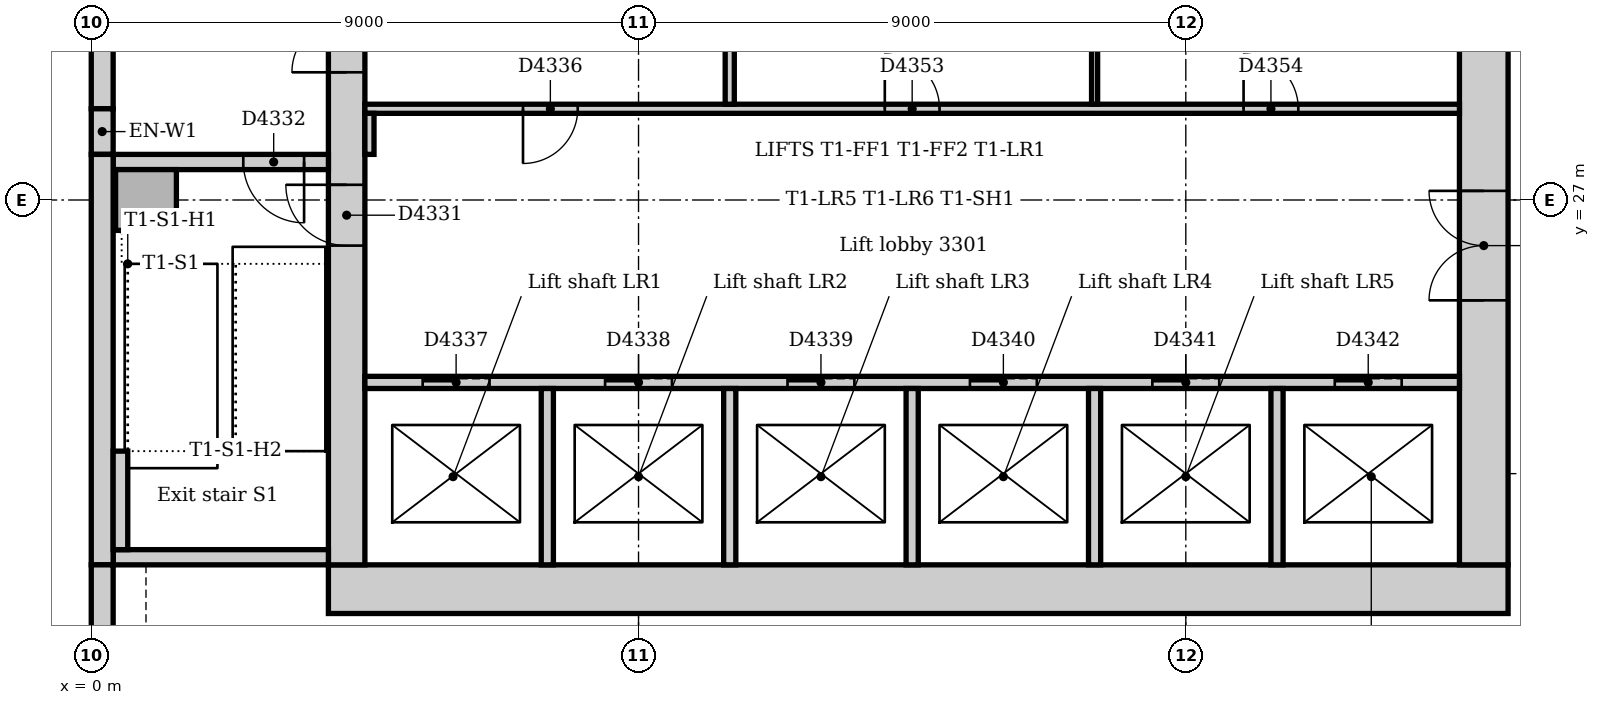
"""IFC4 building model, lengths in metres.
Left out: names, types, materials, properties, quantities, classifications, styles, units other than length and angle.
Written with IfcOpenShell. Run it as: python <this file> out.ifc"""

import sys

from ifc_helpers import new_model, si_unit, direction, frame, frame_2d, origin, origin_2d, place, context, subcontext, project, spatial, rectangle, extrude, element, fill, save


model = new_model("IFC4")
c1 = context("Model", 3, precision=1e-05, world=origin(), true_north=direction((0.0, 1.0)))
c2 = subcontext(c1, "Body", "Model", "MODEL_VIEW")
j1 = project(units=[si_unit("LENGTHUNIT", "METRE"), si_unit("PLANEANGLEUNIT", "RADIAN")], contexts=[c1])
p1 = place(None, origin())
s1 = spatial("IfcSite", under=j1, at=p1, CompositionType="ELEMENT")
p2 = place(p1, origin())
s2 = spatial("IfcBuilding", under=s1, at=p2, CompositionType="ELEMENT")
p3 = place(p2, frame((0.0, 0.0, 140.0)))
s3 = spatial("IfcBuildingStorey", under=s2, at=p3, CompositionType="ELEMENT", Elevation=140.0)
p4 = place(p3, frame((3.9, 20.6, 0.0), z_axis=(0.0, 0.0, 1.0), x_axis=(1.0, 0.0, 0.0)))
e1 = element("IfcWall", 1, at=p4, inside=s3, PredefinedType="SOLIDWALL", context=c2, shape_type="SweptSolid", body=[
    extrude(rectangle(XDim=19.4, YDim=0.8, at=frame_2d((9.7, 0.0))), origin(), (0.0, 0.0, 1.0), 4.0),
])
p5 = place(p3, frame((22.9, 21.0, 0.0), z_axis=(0.0, 0.0, 1.0), x_axis=(0.0, 1.0, 0.0)))
e2 = element("IfcWall", 2, at=p5, inside=s3, PredefinedType="SOLIDWALL", context=c2, shape_type="SweptSolid", body=[
    extrude(rectangle(XDim=10.5, YDim=0.8, at=frame_2d((5.25, 0.0))), origin(), (0.0, 0.0, 1.0), 4.0),
])
p6 = place(p5, frame((4.35, 0.0, 0.0)))
e3 = element("IfcOpeningElement", 3, at=p6, cuts=e2, PredefinedType="OPENING", context=c2, shape_type="SweptSolid", body=[
    extrude(rectangle(XDim=1.8, YDim=2.1, at=frame_2d((0.9, 1.05))), frame((0.0, 0.41, 0.0), z_axis=(0.0, -1.0, 0.0), x_axis=(1.0, 0.0, 0.0)), (0.0, 0.0, 1.0), 0.82),
])
p7 = place(p3, frame((4.2, 31.5, 0.0), z_axis=(0.0, 0.0, 1.0), x_axis=(0.0, -1.0, 0.0)))
e4 = element("IfcWall", 4, at=p7, inside=s3, PredefinedType="SOLIDWALL", context=c2, shape_type="SweptSolid", body=[
    extrude(rectangle(XDim=10.5, YDim=0.6, at=frame_2d((5.25, 0.0))), origin(), (0.0, 0.0, 1.0), 4.0),
])
p8 = place(p7, frame((4.25, 0.0, 0.0)))
e5 = element("IfcOpeningElement", 5, at=p8, cuts=e4, PredefinedType="OPENING", context=c2, shape_type="SweptSolid", body=[
    extrude(rectangle(XDim=1.0, YDim=2.1, at=frame_2d((0.5, 1.05))), frame((0.0, 0.31, 0.0), z_axis=(0.0, -1.0, 0.0), x_axis=(1.0, 0.0, 0.0)), (0.0, 0.0, 1.0), 0.62),
])
p9 = place(p7, frame((0.6, 0.0, 0.0)))
e6 = element("IfcOpeningElement", 6, at=p9, cuts=e4, PredefinedType="OPENING", context=c2, shape_type="SweptSolid", body=[
    extrude(rectangle(XDim=1.8, YDim=2.1, at=frame_2d((0.9, 1.05))), frame((0.0, 0.31, 0.0), z_axis=(0.0, -1.0, 0.0), x_axis=(1.0, 0.0, 0.0)), (0.0, 0.0, 1.0), 0.62),
])
p10 = place(p3, frame((0.36, 21.125, 0.0), z_axis=(0.0, 0.0, 1.0), x_axis=(1.0, 0.0, 0.0)))
e7 = element("IfcWall", 7, at=p10, inside=s3, PredefinedType="SOLIDWALL", context=c2, shape_type="SweptSolid", body=[
    extrude(rectangle(XDim=3.54, YDim=0.25, at=frame_2d((1.77, 0.0))), origin(), (0.0, 0.0, 1.0), 4.0),
])
p11 = place(p3, frame((3.9, 27.625, 0.0), z_axis=(0.0, 0.0, 1.0), x_axis=(-1.0, 0.0, 0.0)))
e8 = element("IfcWall", 8, at=p11, inside=s3, PredefinedType="SOLIDWALL", context=c2, shape_type="SweptSolid", body=[
    extrude(rectangle(XDim=3.54, YDim=0.25, at=frame_2d((1.77, 0.0))), origin(), (0.0, 0.0, 1.0), 4.0),
])
p12 = place(p11, frame((0.4, 0.0, 0.0)))
e9 = element("IfcOpeningElement", 9, at=p12, cuts=e8, PredefinedType="OPENING", context=c2, shape_type="SweptSolid", body=[
    extrude(rectangle(XDim=1.0, YDim=2.1, at=frame_2d((0.5, 1.05))), frame((0.0, 0.135, 0.0), z_axis=(0.0, -1.0, 0.0), x_axis=(1.0, 0.0, 0.0)), (0.0, 0.0, 1.0), 0.27),
])
p13 = place(p3, frame((0.9, 27.0, 0.0), z_axis=(0.0, 0.0, 1.0), x_axis=(1.0, 0.0, 0.0)))
e10 = element("IfcColumn", 10, at=p13, inside=s3, PredefinedType="COLUMN", context=c2, shape_type="SweptSolid", body=[
    extrude(rectangle(XDim=1.0, YDim=1.0, at=origin_2d()), origin(), (0.0, 0.0, 1.0), 4.0),
])
p14 = place(p3, frame((0.18, 34.5, 0.0), z_axis=(0.0, 0.0, 1.0), x_axis=(0.0, -1.0, 0.0)))
e11 = element("IfcWall", 11, at=p14, inside=s3, PredefinedType="STANDARD", context=c2, shape_type="SweptSolid", body=[
    extrude(rectangle(XDim=6.0, YDim=0.36, at=frame_2d((3.0, 0.0))), origin(), (0.0, 0.0, 1.0), 3.7),
])
p15 = place(p14, frame((2.1, 0.0, 0.0)))
e12 = element("IfcOpeningElement", 12, at=p15, cuts=e11, PredefinedType="OPENING", context=c2, shape_type="SweptSolid", body=[
    extrude(rectangle(XDim=1.8, YDim=2.4, at=frame_2d((0.9, 1.2))), frame((0.0, 0.19, 0.0), z_axis=(0.0, -1.0, 0.0), x_axis=(1.0, 0.0, 0.0)), (0.0, 0.0, 1.0), 0.38),
])
p16 = place(p3, frame((0.18, 28.5, 0.0), z_axis=(0.0, 0.0, 1.0), x_axis=(0.0, -1.0, 0.0)))
e13 = element("IfcWall", 13, at=p16, inside=s3, PredefinedType="STANDARD", context=c2, shape_type="SweptSolid", body=[
    extrude(rectangle(XDim=0.75, YDim=0.36, at=frame_2d((0.375, 0.0))), origin(), (0.0, 0.0, 1.0), 3.7),
])
p17 = place(p3, frame((0.18, 27.75, 0.0), z_axis=(0.0, 0.0, 1.0), x_axis=(0.0, -1.0, 0.0)))
e14 = element("IfcWall", 14, at=p17, inside=s3, PredefinedType="STANDARD", context=c2, shape_type="SweptSolid", body=[
    extrude(rectangle(XDim=6.75, YDim=0.36, at=frame_2d((3.375, 0.0))), origin(), (0.0, 0.0, 1.0), 3.7),
])
p18 = place(p3, frame((0.18, 21.0, 0.0), z_axis=(0.0, 0.0, 1.0), x_axis=(0.0, -1.0, 0.0)))
e15 = element("IfcWall", 15, at=p18, inside=s3, PredefinedType="STANDARD", context=c2, shape_type="SweptSolid", body=[
    extrude(rectangle(XDim=12.257, YDim=0.36, at=frame_2d((6.129, 0.0))), origin(), (0.0, 0.0, 1.0), 3.7),
])
p19 = place(p18, frame((1.35, 0.0, 0.9)))
e16 = element("IfcOpeningElement", 16, at=p19, cuts=e15, PredefinedType="OPENING", context=c2, shape_type="SweptSolid", body=[
    extrude(rectangle(XDim=3.3, YDim=1.6, at=frame_2d((1.65, 0.8))), frame((0.0, 0.19, 0.0), z_axis=(0.0, -1.0, 0.0), x_axis=(1.0, 0.0, 0.0)), (0.0, 0.0, 1.0), 0.38),
])
p20 = place(p18, frame((5.85, 0.0, 0.9)))
e17 = element("IfcOpeningElement", 17, at=p20, cuts=e15, PredefinedType="OPENING", context=c2, shape_type="SweptSolid", body=[
    extrude(rectangle(XDim=3.3, YDim=1.6, at=frame_2d((1.65, 0.8))), frame((0.0, 0.19, 0.0), z_axis=(0.0, -1.0, 0.0), x_axis=(1.0, 0.0, 0.0)), (0.0, 0.0, 1.0), 0.38),
])
p21 = place(p3, frame((0.48, 21.25, 0.0), z_axis=(0.0, 0.0, 1.0), x_axis=(0.0, 1.0, 0.0)))
e18 = element("IfcWall", 18, at=p21, inside=s3, PredefinedType="STANDARD", context=c2, shape_type="SweptSolid", body=[
    extrude(rectangle(XDim=1.62, YDim=0.24, at=frame_2d((0.81, 0.0))), origin(), (0.0, 0.0, 1.0), 4.0),
])
p22 = place(p3, frame((4.5, 24.0, 0.0), z_axis=(0.0, 0.0, 1.0), x_axis=(1.0, 0.0, 0.0)))
e19 = element("IfcWall", 19, at=p22, inside=s3, PredefinedType="PARTITIONING", context=c2, shape_type="SweptSolid", body=[
    extrude(rectangle(XDim=18.0, YDim=0.2, at=frame_2d((9.0, 0.0))), origin(), (0.0, 0.0, 1.0), 3.7),
])
p23 = place(p22, frame((0.95, 0.0, 0.0)))
e20 = element("IfcOpeningElement", 20, at=p23, cuts=e19, PredefinedType="OPENING", context=c2, shape_type="SweptSolid", body=[
    extrude(rectangle(XDim=1.1, YDim=2.1, at=frame_2d((0.55, 1.05))), frame((0.0, 0.11, 0.0), z_axis=(0.0, -1.0, 0.0), x_axis=(1.0, 0.0, 0.0)), (0.0, 0.0, 1.0), 0.22),
])
p24 = place(p22, frame((3.95, 0.0, 0.0)))
e21 = element("IfcOpeningElement", 21, at=p24, cuts=e19, PredefinedType="OPENING", context=c2, shape_type="SweptSolid", body=[
    extrude(rectangle(XDim=1.1, YDim=2.1, at=frame_2d((0.55, 1.05))), frame((0.0, 0.11, 0.0), z_axis=(0.0, -1.0, 0.0), x_axis=(1.0, 0.0, 0.0)), (0.0, 0.0, 1.0), 0.22),
])
p25 = place(p22, frame((6.95, 0.0, 0.0)))
e22 = element("IfcOpeningElement", 22, at=p25, cuts=e19, PredefinedType="OPENING", context=c2, shape_type="SweptSolid", body=[
    extrude(rectangle(XDim=1.1, YDim=2.1, at=frame_2d((0.55, 1.05))), frame((0.0, 0.11, 0.0), z_axis=(0.0, -1.0, 0.0), x_axis=(1.0, 0.0, 0.0)), (0.0, 0.0, 1.0), 0.22),
])
p26 = place(p22, frame((9.95, 0.0, 0.0)))
e23 = element("IfcOpeningElement", 23, at=p26, cuts=e19, PredefinedType="OPENING", context=c2, shape_type="SweptSolid", body=[
    extrude(rectangle(XDim=1.1, YDim=2.1, at=frame_2d((0.55, 1.05))), frame((0.0, 0.11, 0.0), z_axis=(0.0, -1.0, 0.0), x_axis=(1.0, 0.0, 0.0)), (0.0, 0.0, 1.0), 0.22),
])
p27 = place(p22, frame((12.95, 0.0, 0.0)))
e24 = element("IfcOpeningElement", 24, at=p27, cuts=e19, PredefinedType="OPENING", context=c2, shape_type="SweptSolid", body=[
    extrude(rectangle(XDim=1.1, YDim=2.1, at=frame_2d((0.55, 1.05))), frame((0.0, 0.11, 0.0), z_axis=(0.0, -1.0, 0.0), x_axis=(1.0, 0.0, 0.0)), (0.0, 0.0, 1.0), 0.22),
])
p28 = place(p22, frame((15.95, 0.0, 0.0)))
e25 = element("IfcOpeningElement", 25, at=p28, cuts=e19, PredefinedType="OPENING", context=c2, shape_type="SweptSolid", body=[
    extrude(rectangle(XDim=1.1, YDim=2.1, at=frame_2d((0.55, 1.05))), frame((0.0, 0.11, 0.0), z_axis=(0.0, -1.0, 0.0), x_axis=(1.0, 0.0, 0.0)), (0.0, 0.0, 1.0), 0.22),
])
for number, where, z_axis, x_axis in (
    (26, (7.5, 21.0, 0.0), (0.0, 0.0, 1.0), (0.0, 1.0, 0.0)),
    (27, (10.5, 21.0, 0.0), (0.0, 0.0, 1.0), (0.0, 1.0, 0.0)),
    (28, (13.5, 21.0, 0.0), (0.0, 0.0, 1.0), (0.0, 1.0, 0.0)),
    (29, (16.5, 21.0, 0.0), (0.0, 0.0, 1.0), (0.0, 1.0, 0.0)),
    (30, (19.5, 21.0, 0.0), (0.0, 0.0, 1.0), (0.0, 1.0, 0.0)),
):
    element("IfcWall", number, at=place(p3, frame(where, z_axis=z_axis, x_axis=x_axis)), inside=s3, PredefinedType="PARTITIONING", context=c2, shape_type="SweptSolid", body=[
        extrude(rectangle(XDim=2.9, YDim=0.2, at=frame_2d((1.45, 0.0))), origin(), (0.0, 0.0, 1.0), 3.7),
    ])
p29 = place(p3, frame((4.5, 28.5, 0.0), z_axis=(0.0, 0.0, 1.0), x_axis=(1.0, 0.0, 0.0)))
e31 = element("IfcWall", 31, at=p29, inside=s3, PredefinedType="PARTITIONING", context=c2, shape_type="SweptSolid", body=[
    extrude(rectangle(XDim=18.0, YDim=0.15, at=frame_2d((9.0, 0.0))), origin(), (0.0, 0.0, 1.0), 3.7),
])
p30 = place(p29, frame((2.6, 0.0, 0.0)))
e32 = element("IfcOpeningElement", 32, at=p30, cuts=e31, PredefinedType="OPENING", context=c2, shape_type="SweptSolid", body=[
    extrude(rectangle(XDim=0.9, YDim=2.1, at=frame_2d((0.45, 1.05))), frame((0.0, 0.085, 0.0), z_axis=(0.0, -1.0, 0.0), x_axis=(1.0, 0.0, 0.0)), (0.0, 0.0, 1.0), 0.17),
])
p31 = place(p29, frame((8.55, 0.0, 0.0)))
e33 = element("IfcOpeningElement", 33, at=p31, cuts=e31, PredefinedType="OPENING", context=c2, shape_type="SweptSolid", body=[
    extrude(rectangle(XDim=0.9, YDim=2.1, at=frame_2d((0.45, 1.05))), frame((0.0, 0.085, 0.0), z_axis=(0.0, -1.0, 0.0), x_axis=(1.0, 0.0, 0.0)), (0.0, 0.0, 1.0), 0.17),
])
p32 = place(p29, frame((14.45, 0.0, 0.0)))
e34 = element("IfcOpeningElement", 34, at=p32, cuts=e31, PredefinedType="OPENING", context=c2, shape_type="SweptSolid", body=[
    extrude(rectangle(XDim=0.9, YDim=2.1, at=frame_2d((0.45, 1.05))), frame((0.0, 0.085, 0.0), z_axis=(0.0, -1.0, 0.0), x_axis=(1.0, 0.0, 0.0)), (0.0, 0.0, 1.0), 0.17),
])
p33 = place(p3, frame((10.5, 28.575, 0.0), z_axis=(0.0, 0.0, 1.0), x_axis=(0.0, 1.0, 0.0)))
e35 = element("IfcWall", 35, at=p33, inside=s3, PredefinedType="PARTITIONING", context=c2, shape_type="SweptSolid", body=[
    extrude(rectangle(XDim=2.675, YDim=0.15, at=frame_2d((1.337, 0.0))), origin(), (0.0, 0.0, 1.0), 3.7),
])
p34 = place(p3, frame((4.575, 27.75, 0.0), z_axis=(0.0, 0.0, 1.0), x_axis=(0.0, 1.0, 0.0)))
e36 = element("IfcWall", 36, at=p34, inside=s3, PredefinedType="PARTITIONING", context=c2, shape_type="SweptSolid", body=[
    extrude(rectangle(XDim=0.675, YDim=0.15, at=frame_2d((0.338, 0.0))), origin(), (0.0, 0.0, 1.0), 3.7),
])
p35 = place(p3, frame((16.5, 28.575, 0.0), z_axis=(0.0, 0.0, 1.0), x_axis=(0.0, 1.0, 0.0)))
e37 = element("IfcWall", 37, at=p35, inside=s3, PredefinedType="PARTITIONING", context=c2, shape_type="SweptSolid", body=[
    extrude(rectangle(XDim=2.675, YDim=0.1, at=frame_2d((1.337, 0.0))), origin(), (0.0, 0.0, 1.0), 3.7),
])
p36 = place(p8, frame((1.0, 0.0, 0.0), z_axis=(0.0, 0.0, 1.0), x_axis=(-1.0, 0.0, 0.0)))
e38 = element("IfcDoor", 38, at=p36, inside=s3, OperationType="SINGLE_SWING_RIGHT", PredefinedType="DOOR", context=c2, shape_type="SweptSolid", body=[
    extrude(rectangle(XDim=1.0, YDim=2.1, at=frame_2d((0.5, 1.05))), frame((0.0, 0.025, 0.0), z_axis=(0.0, -1.0, 0.0), x_axis=(1.0, 0.0, 0.0)), (0.0, 0.0, 1.0), 0.05),
])
fill(e5, e38)
p37 = place(p12, origin())
e39 = element("IfcDoor", 39, at=p37, inside=s3, OperationType="SINGLE_SWING_LEFT", PredefinedType="DOOR", context=c2, shape_type="SweptSolid", body=[
    extrude(rectangle(XDim=1.0, YDim=2.1, at=frame_2d((0.5, 1.05))), frame((0.0, 0.025, 0.0), z_axis=(0.0, -1.0, 0.0), x_axis=(1.0, 0.0, 0.0)), (0.0, 0.0, 1.0), 0.05),
])
fill(e9, e39)
p38 = place(p9, frame((1.8, 0.0, 0.0), z_axis=(0.0, 0.0, 1.0), x_axis=(-1.0, 0.0, 0.0)))
e40 = element("IfcDoor", 40, at=p38, inside=s3, OperationType="DOUBLE_DOOR_DOUBLE_SWING", PredefinedType="DOOR", context=c2, shape_type="SweptSolid", body=[
    extrude(rectangle(XDim=1.8, YDim=2.1, at=frame_2d((0.9, 1.05))), frame((0.0, 0.025, 0.0), z_axis=(0.0, -1.0, 0.0), x_axis=(1.0, 0.0, 0.0)), (0.0, 0.0, 1.0), 0.05),
])
fill(e6, e40)
p39 = place(p30, frame((0.9, 0.0, 0.0), z_axis=(0.0, 0.0, 1.0), x_axis=(-1.0, 0.0, 0.0)))
e41 = element("IfcDoor", 41, at=p39, inside=s3, OperationType="SINGLE_SWING_RIGHT", PredefinedType="DOOR", context=c2, shape_type="SweptSolid", body=[
    extrude(rectangle(XDim=0.9, YDim=2.1, at=frame_2d((0.45, 1.05))), frame((0.0, 0.025, 0.0), z_axis=(0.0, -1.0, 0.0), x_axis=(1.0, 0.0, 0.0)), (0.0, 0.0, 1.0), 0.05),
])
fill(e32, e41)
p40 = place(p23, origin())
e42 = element("IfcDoor", 42, at=p40, inside=s3, OperationType="SLIDING_TO_LEFT", PredefinedType="DOOR", context=c2, shape_type="SweptSolid", body=[
    extrude(rectangle(XDim=1.1, YDim=2.1, at=frame_2d((0.55, 1.05))), frame((0.0, 0.025, 0.0), z_axis=(0.0, -1.0, 0.0), x_axis=(1.0, 0.0, 0.0)), (0.0, 0.0, 1.0), 0.05),
])
fill(e20, e42)
p41 = place(p24, origin())
e43 = element("IfcDoor", 43, at=p41, inside=s3, OperationType="SLIDING_TO_LEFT", PredefinedType="DOOR", context=c2, shape_type="SweptSolid", body=[
    extrude(rectangle(XDim=1.1, YDim=2.1, at=frame_2d((0.55, 1.05))), frame((0.0, 0.025, 0.0), z_axis=(0.0, -1.0, 0.0), x_axis=(1.0, 0.0, 0.0)), (0.0, 0.0, 1.0), 0.05),
])
fill(e21, e43)
p42 = place(p25, origin())
e44 = element("IfcDoor", 44, at=p42, inside=s3, OperationType="SLIDING_TO_LEFT", PredefinedType="DOOR", context=c2, shape_type="SweptSolid", body=[
    extrude(rectangle(XDim=1.1, YDim=2.1, at=frame_2d((0.55, 1.05))), frame((0.0, 0.025, 0.0), z_axis=(0.0, -1.0, 0.0), x_axis=(1.0, 0.0, 0.0)), (0.0, 0.0, 1.0), 0.05),
])
fill(e22, e44)
p43 = place(p26, origin())
e45 = element("IfcDoor", 45, at=p43, inside=s3, OperationType="SLIDING_TO_LEFT", PredefinedType="DOOR", context=c2, shape_type="SweptSolid", body=[
    extrude(rectangle(XDim=1.1, YDim=2.1, at=frame_2d((0.55, 1.05))), frame((0.0, 0.025, 0.0), z_axis=(0.0, -1.0, 0.0), x_axis=(1.0, 0.0, 0.0)), (0.0, 0.0, 1.0), 0.05),
])
fill(e23, e45)
p44 = place(p27, origin())
e46 = element("IfcDoor", 46, at=p44, inside=s3, OperationType="SLIDING_TO_LEFT", PredefinedType="DOOR", context=c2, shape_type="SweptSolid", body=[
    extrude(rectangle(XDim=1.1, YDim=2.1, at=frame_2d((0.55, 1.05))), frame((0.0, 0.025, 0.0), z_axis=(0.0, -1.0, 0.0), x_axis=(1.0, 0.0, 0.0)), (0.0, 0.0, 1.0), 0.05),
])
fill(e24, e46)
p45 = place(p28, origin())
e47 = element("IfcDoor", 47, at=p45, inside=s3, OperationType="SLIDING_TO_LEFT", PredefinedType="DOOR", context=c2, shape_type="SweptSolid", body=[
    extrude(rectangle(XDim=1.1, YDim=2.1, at=frame_2d((0.55, 1.05))), frame((0.0, 0.025, 0.0), z_axis=(0.0, -1.0, 0.0), x_axis=(1.0, 0.0, 0.0)), (0.0, 0.0, 1.0), 0.05),
])
fill(e25, e47)
p46 = place(p6, origin())
e48 = element("IfcDoor", 48, at=p46, inside=s3, OperationType="DOUBLE_DOOR_DOUBLE_SWING", PredefinedType="DOOR", context=c2, shape_type="SweptSolid", body=[
    extrude(rectangle(XDim=1.8, YDim=2.1, at=frame_2d((0.9, 1.05))), frame((0.0, 0.025, 0.0), z_axis=(0.0, -1.0, 0.0), x_axis=(1.0, 0.0, 0.0)), (0.0, 0.0, 1.0), 0.05),
])
fill(e3, e48)
p47 = place(p31, origin())
e49 = element("IfcDoor", 49, at=p47, inside=s3, OperationType="SINGLE_SWING_LEFT", PredefinedType="DOOR", context=c2, shape_type="SweptSolid", body=[
    extrude(rectangle(XDim=0.9, YDim=2.1, at=frame_2d((0.45, 1.05))), frame((0.0, 0.025, 0.0), z_axis=(0.0, -1.0, 0.0), x_axis=(1.0, 0.0, 0.0)), (0.0, 0.0, 1.0), 0.05),
])
fill(e33, e49)
p48 = place(p32, origin())
e50 = element("IfcDoor", 50, at=p48, inside=s3, OperationType="SINGLE_SWING_LEFT", PredefinedType="DOOR", context=c2, shape_type="SweptSolid", body=[
    extrude(rectangle(XDim=0.9, YDim=2.1, at=frame_2d((0.45, 1.05))), frame((0.0, 0.025, 0.0), z_axis=(0.0, -1.0, 0.0), x_axis=(1.0, 0.0, 0.0)), (0.0, 0.0, 1.0), 0.05),
])
fill(e34, e50)
save(model, sys.argv[1])
